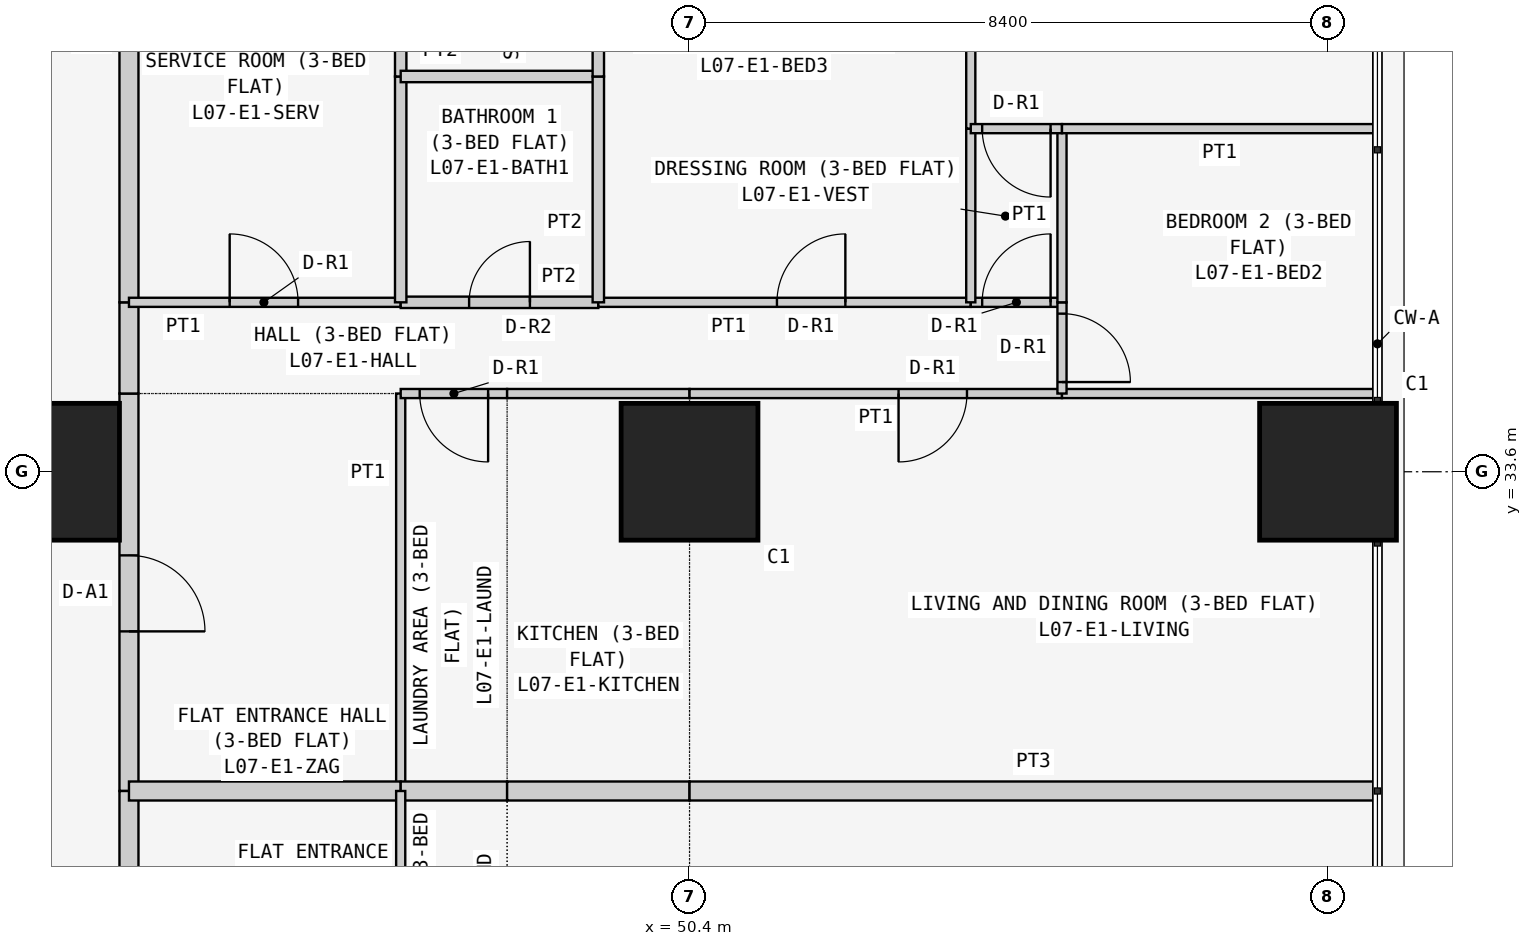
"""IFC4 building model, lengths in metres.
Left out: names, types, materials, properties, quantities, classifications, styles, units other than length and angle.
Written with IfcOpenShell. Run it as: python <this file> out.ifc"""

import sys

from ifc_helpers import new_model, si_unit, direction, frame, frame_2d, origin, origin_2d, place, context, subcontext, project, spatial, rectangle, extrude, element, fill, save


model = new_model("IFC4")
c1 = context("Model", 3, precision=1e-05, world=origin(), true_north=direction((0.0, 1.0)))
c2 = subcontext(c1, "Body", "Model", "MODEL_VIEW")
j1 = project(units=[si_unit("LENGTHUNIT", "METRE"), si_unit("PLANEANGLEUNIT", "RADIAN")], contexts=[c1])
p1 = place(None, origin())
s1 = spatial("IfcSite", under=j1, at=p1, CompositionType="ELEMENT")
p2 = place(p1, origin())
s2 = spatial("IfcBuilding", under=s1, at=p2, CompositionType="ELEMENT")
p3 = place(p2, frame((0.0, 0.0, 34.5)))
s3 = spatial("IfcBuildingStorey", under=s2, at=p3, CompositionType="ELEMENT", Elevation=34.5)
for number, where, z_axis, x_axis in (
    (1, (42.0, 33.6, 0.0), (0.0, 0.0, 1.0), (1.0, 0.0, 0.0)),
    (2, (50.4, 33.6, 0.0), (0.0, 0.0, 1.0), (1.0, 0.0, 0.0)),
    (3, (58.8, 33.6, 0.0), (0.0, 0.0, 1.0), (1.0, 0.0, 0.0)),
):
    element("IfcColumn", number, at=place(p3, frame(where, z_axis=z_axis, x_axis=x_axis)), inside=s3, PredefinedType="COLUMN", context=c2, shape_type="SweptSolid", body=[
        extrude(rectangle(XDim=1.8, YDim=1.8, at=origin_2d()), origin(), (0.0, 0.0, 1.0), 3.6),
    ])
p4 = place(p3, frame((43.025, 34.629, 0.0), z_axis=(0.0, 0.0, 1.0), x_axis=(0.0, -1.0, 0.0)))
e4 = element("IfcWall", 4, at=p4, inside=s3, PredefinedType="PARTITIONING", context=c2, shape_type="SweptSolid", body=[
    extrude(rectangle(XDim=5.229, YDim=0.25, at=frame_2d((2.615, 0.0))), origin(), (0.0, 0.0, 1.0), 3.45),
])
p5 = place(p4, frame((2.129, 0.0, 0.0)))
e5 = element("IfcOpeningElement", 5, at=p5, cuts=e4, PredefinedType="OPENING", context=c2, shape_type="SweptSolid", body=[
    extrude(rectangle(XDim=1.0, YDim=2.1, at=frame_2d((0.5, 1.05))), frame((0.0, 0.135, 0.0), z_axis=(0.0, -1.0, 0.0), x_axis=(1.0, 0.0, 0.0)), (0.0, 0.0, 1.0), 0.27),
])
p6 = place(p3, frame((43.025, 35.829, 0.0), z_axis=(0.0, 0.0, 1.0), x_axis=(0.0, -1.0, 0.0)))
e6 = element("IfcWall", 6, at=p6, inside=s3, PredefinedType="PARTITIONING", context=c2, shape_type="SweptSolid", body=[
    extrude(rectangle(XDim=1.2, YDim=0.25, at=frame_2d((0.6, 0.0))), origin(), (0.0, 0.0, 1.0), 3.45),
])
p7 = place(p3, frame((43.025, 42.7, 0.0), z_axis=(0.0, 0.0, 1.0), x_axis=(0.0, -1.0, 0.0)))
e7 = element("IfcWall", 7, at=p7, inside=s3, PredefinedType="PARTITIONING", context=c2, shape_type="SweptSolid", body=[
    extrude(rectangle(XDim=6.871, YDim=0.25, at=frame_2d((3.436, 0.0))), origin(), (0.0, 0.0, 1.0), 3.45),
])
p8 = place(p3, frame((43.025, 29.4, 0.0), z_axis=(0.0, 0.0, 1.0), x_axis=(0.0, -1.0, 0.0)))
e8 = element("IfcWall", 8, at=p8, inside=s3, PredefinedType="PARTITIONING", context=c2, shape_type="SweptSolid", body=[
    extrude(rectangle(XDim=5.229, YDim=0.25, at=frame_2d((2.615, 0.0))), origin(), (0.0, 0.0, 1.0), 3.45),
])
p9 = place(p8, frame((2.1, 0.0, 0.0)))
e9 = element("IfcOpeningElement", 9, at=p9, cuts=e8, PredefinedType="OPENING", context=c2, shape_type="SweptSolid", body=[
    extrude(rectangle(XDim=1.0, YDim=2.1, at=frame_2d((0.5, 1.05))), frame((0.0, 0.135, 0.0), z_axis=(0.0, -1.0, 0.0), x_axis=(1.0, 0.0, 0.0)), (0.0, 0.0, 1.0), 0.27),
])
p10 = place(p3, frame((46.6, 29.4, 0.0), z_axis=(0.0, 0.0, 1.0), x_axis=(0.0, 1.0, 0.0)))
e10 = element("IfcWall", 10, at=p10, inside=s3, PredefinedType="PARTITIONING", context=c2, shape_type="SweptSolid", body=[
    extrude(rectangle(XDim=5.229, YDim=0.12, at=frame_2d((2.615, 0.0))), origin(), (0.0, 0.0, 1.0), 3.45),
])
p11 = place(p3, frame((43.025, 29.4, 0.0), z_axis=(0.0, 0.0, 1.0), x_axis=(1.0, 0.0, 0.0)))
e11 = element("IfcWall", 11, at=p11, inside=s3, PredefinedType="PARTITIONING", context=c2, shape_type="SweptSolid", body=[
    extrude(rectangle(XDim=3.575, YDim=0.25, at=frame_2d((1.788, 0.0))), origin(), (0.0, 0.0, 1.0), 3.45),
])
p12 = place(p3, frame((48.0, 34.629, 0.0), z_axis=(0.0, 0.0, 1.0), x_axis=(-1.0, 0.0, 0.0)))
e12 = element("IfcWall", 12, at=p12, inside=s3, PredefinedType="PARTITIONING", context=c2, shape_type="SweptSolid", body=[
    extrude(rectangle(XDim=1.4, YDim=0.12, at=frame_2d((0.7, 0.0))), origin(), (0.0, 0.0, 1.0), 3.45),
])
p13 = place(p12, frame((0.25, 0.0, 0.0)))
e13 = element("IfcOpeningElement", 13, at=p13, cuts=e12, PredefinedType="OPENING", context=c2, shape_type="SweptSolid", body=[
    extrude(rectangle(XDim=0.9, YDim=2.1, at=frame_2d((0.45, 1.05))), frame((0.0, 0.07, 0.0), z_axis=(0.0, -1.0, 0.0), x_axis=(1.0, 0.0, 0.0)), (0.0, 0.0, 1.0), 0.14),
])
p14 = place(p3, frame((46.6, 29.4, 0.0), z_axis=(0.0, 0.0, 1.0), x_axis=(1.0, 0.0, 0.0)))
e14 = element("IfcWall", 14, at=p14, inside=s3, PredefinedType="PARTITIONING", context=c2, shape_type="SweptSolid", body=[
    extrude(rectangle(XDim=1.4, YDim=0.25, at=frame_2d((0.7, 0.0))), origin(), (0.0, 0.0, 1.0), 3.45),
])
p15 = place(p3, frame((50.4, 34.629, 0.0), z_axis=(0.0, 0.0, 1.0), x_axis=(-1.0, 0.0, 0.0)))
e15 = element("IfcWall", 15, at=p15, inside=s3, PredefinedType="PARTITIONING", context=c2, shape_type="SweptSolid", body=[
    extrude(rectangle(XDim=2.4, YDim=0.12, at=frame_2d((1.2, 0.0))), origin(), (0.0, 0.0, 1.0), 3.45),
])
p16 = place(p3, frame((48.0, 29.4, 0.0), z_axis=(0.0, 0.0, 1.0), x_axis=(1.0, 0.0, 0.0)))
e16 = element("IfcWall", 16, at=p16, inside=s3, PredefinedType="PARTITIONING", context=c2, shape_type="SweptSolid", body=[
    extrude(rectangle(XDim=2.4, YDim=0.25, at=frame_2d((1.2, 0.0))), origin(), (0.0, 0.0, 1.0), 3.45),
])
p17 = place(p3, frame((55.3, 34.629, 0.0), z_axis=(0.0, 0.0, 1.0), x_axis=(-1.0, 0.0, 0.0)))
e17 = element("IfcWall", 17, at=p17, inside=s3, PredefinedType="PARTITIONING", context=c2, shape_type="SweptSolid", body=[
    extrude(rectangle(XDim=4.9, YDim=0.12, at=frame_2d((2.45, 0.0))), origin(), (0.0, 0.0, 1.0), 3.45),
])
p18 = place(p17, frame((1.25, 0.0, 0.0)))
e18 = element("IfcOpeningElement", 18, at=p18, cuts=e17, PredefinedType="OPENING", context=c2, shape_type="SweptSolid", body=[
    extrude(rectangle(XDim=0.9, YDim=2.1, at=frame_2d((0.45, 1.05))), frame((0.0, 0.07, 0.0), z_axis=(0.0, -1.0, 0.0), x_axis=(1.0, 0.0, 0.0)), (0.0, 0.0, 1.0), 0.14),
])
p19 = place(p3, frame((59.45, 34.629, 0.0), z_axis=(0.0, 0.0, 1.0), x_axis=(-1.0, 0.0, 0.0)))
e19 = element("IfcWall", 19, at=p19, inside=s3, PredefinedType="PARTITIONING", context=c2, shape_type="SweptSolid", body=[
    extrude(rectangle(XDim=4.15, YDim=0.12, at=frame_2d((2.075, 0.0))), origin(), (0.0, 0.0, 1.0), 3.45),
])
p20 = place(p3, frame((50.4, 29.4, 0.0), z_axis=(0.0, 0.0, 1.0), x_axis=(1.0, 0.0, 0.0)))
e20 = element("IfcWall", 20, at=p20, inside=s3, PredefinedType="PARTITIONING", context=c2, shape_type="SweptSolid", body=[
    extrude(rectangle(XDim=9.05, YDim=0.25, at=frame_2d((4.525, 0.0))), origin(), (0.0, 0.0, 1.0), 3.45),
])
p21 = place(p3, frame((46.6, 35.829, 0.0), z_axis=(0.0, 0.0, 1.0), x_axis=(-1.0, 0.0, 0.0)))
e21 = element("IfcWall", 21, at=p21, inside=s3, PredefinedType="PARTITIONING", context=c2, shape_type="SweptSolid", body=[
    extrude(rectangle(XDim=3.575, YDim=0.12, at=frame_2d((1.788, 0.0))), origin(), (0.0, 0.0, 1.0), 3.45),
])
p22 = place(p21, frame((1.35, 0.0, 0.0)))
e22 = element("IfcOpeningElement", 22, at=p22, cuts=e21, PredefinedType="OPENING", context=c2, shape_type="SweptSolid", body=[
    extrude(rectangle(XDim=0.9, YDim=2.1, at=frame_2d((0.45, 1.05))), frame((0.0, 0.07, 0.0), z_axis=(0.0, -1.0, 0.0), x_axis=(1.0, 0.0, 0.0)), (0.0, 0.0, 1.0), 0.14),
])
p23 = place(p3, frame((49.2, 35.829, 0.0), z_axis=(0.0, 0.0, 1.0), x_axis=(-1.0, 0.0, 0.0)))
e23 = element("IfcWall", 23, at=p23, inside=s3, PredefinedType="PARTITIONING", context=c2, shape_type="SweptSolid", body=[
    extrude(rectangle(XDim=2.6, YDim=0.15, at=frame_2d((1.3, 0.0))), origin(), (0.0, 0.0, 1.0), 3.45),
])
p24 = place(p23, frame((0.9, 0.0, 0.0)))
e24 = element("IfcOpeningElement", 24, at=p24, cuts=e23, PredefinedType="OPENING", context=c2, shape_type="SweptSolid", body=[
    extrude(rectangle(XDim=0.8, YDim=2.1, at=frame_2d((0.4, 1.05))), frame((0.0, 0.085, 0.0), z_axis=(0.0, -1.0, 0.0), x_axis=(1.0, 0.0, 0.0)), (0.0, 0.0, 1.0), 0.17),
])
p25 = place(p3, frame((54.1, 35.829, 0.0), z_axis=(0.0, 0.0, 1.0), x_axis=(-1.0, 0.0, 0.0)))
e25 = element("IfcWall", 25, at=p25, inside=s3, PredefinedType="PARTITIONING", context=c2, shape_type="SweptSolid", body=[
    extrude(rectangle(XDim=4.9, YDim=0.12, at=frame_2d((2.45, 0.0))), origin(), (0.0, 0.0, 1.0), 3.45),
])
p26 = place(p25, frame((1.65, 0.0, 0.0)))
e26 = element("IfcOpeningElement", 26, at=p26, cuts=e25, PredefinedType="OPENING", context=c2, shape_type="SweptSolid", body=[
    extrude(rectangle(XDim=0.9, YDim=2.1, at=frame_2d((0.45, 1.05))), frame((0.0, 0.07, 0.0), z_axis=(0.0, -1.0, 0.0), x_axis=(1.0, 0.0, 0.0)), (0.0, 0.0, 1.0), 0.14),
])
p27 = place(p3, frame((55.3, 35.829, 0.0), z_axis=(0.0, 0.0, 1.0), x_axis=(-1.0, 0.0, 0.0)))
e27 = element("IfcWall", 27, at=p27, inside=s3, PredefinedType="PARTITIONING", context=c2, shape_type="SweptSolid", body=[
    extrude(rectangle(XDim=1.2, YDim=0.12, at=frame_2d((0.6, 0.0))), origin(), (0.0, 0.0, 1.0), 3.45),
])
p28 = place(p27, frame((0.15, 0.0, 0.0)))
e28 = element("IfcOpeningElement", 28, at=p28, cuts=e27, PredefinedType="OPENING", context=c2, shape_type="SweptSolid", body=[
    extrude(rectangle(XDim=0.9, YDim=2.1, at=frame_2d((0.45, 1.05))), frame((0.0, 0.07, 0.0), z_axis=(0.0, -1.0, 0.0), x_axis=(1.0, 0.0, 0.0)), (0.0, 0.0, 1.0), 0.14),
])
p29 = place(p3, frame((55.3, 34.629, 0.0), z_axis=(0.0, 0.0, 1.0), x_axis=(0.0, 1.0, 0.0)))
e29 = element("IfcWall", 29, at=p29, inside=s3, PredefinedType="PARTITIONING", context=c2, shape_type="SweptSolid", body=[
    extrude(rectangle(XDim=1.2, YDim=0.12, at=frame_2d((0.6, 0.0))), origin(), (0.0, 0.0, 1.0), 3.45),
])
p30 = place(p29, frame((0.151, 0.0, 0.0)))
e30 = element("IfcOpeningElement", 30, at=p30, cuts=e29, PredefinedType="OPENING", context=c2, shape_type="SweptSolid", body=[
    extrude(rectangle(XDim=0.9, YDim=2.1, at=frame_2d((0.45, 1.05))), frame((0.0, 0.07, 0.0), z_axis=(0.0, -1.0, 0.0), x_axis=(1.0, 0.0, 0.0)), (0.0, 0.0, 1.0), 0.14),
])
p31 = place(p3, frame((46.6, 35.829, 0.0), z_axis=(0.0, 0.0, 1.0), x_axis=(0.0, 1.0, 0.0)))
e31 = element("IfcWall", 31, at=p31, inside=s3, PredefinedType="PARTITIONING", context=c2, shape_type="SweptSolid", body=[
    extrude(rectangle(XDim=2.971, YDim=0.15, at=frame_2d((1.485, 0.0))), origin(), (0.0, 0.0, 1.0), 3.45),
])
p32 = place(p3, frame((46.6, 38.8, 0.0), z_axis=(0.0, 0.0, 1.0), x_axis=(0.0, 1.0, 0.0)))
e32 = element("IfcWall", 32, at=p32, inside=s3, PredefinedType="PARTITIONING", context=c2, shape_type="SweptSolid", body=[
    extrude(rectangle(XDim=3.9, YDim=0.15, at=frame_2d((1.95, 0.0))), origin(), (0.0, 0.0, 1.0), 3.45),
])
p33 = place(p32, frame((1.55, 0.0, 0.0)))
e33 = element("IfcOpeningElement", 33, at=p33, cuts=e32, PredefinedType="OPENING", context=c2, shape_type="SweptSolid", body=[
    extrude(rectangle(XDim=0.8, YDim=2.1, at=frame_2d((0.4, 1.05))), frame((0.0, 0.085, 0.0), z_axis=(0.0, -1.0, 0.0), x_axis=(1.0, 0.0, 0.0)), (0.0, 0.0, 1.0), 0.17),
])
p34 = place(p3, frame((49.2, 38.8, 0.0), z_axis=(0.0, 0.0, 1.0), x_axis=(-1.0, 0.0, 0.0)))
e34 = element("IfcWall", 34, at=p34, inside=s3, PredefinedType="PARTITIONING", context=c2, shape_type="SweptSolid", body=[
    extrude(rectangle(XDim=2.6, YDim=0.15, at=frame_2d((1.3, 0.0))), origin(), (0.0, 0.0, 1.0), 3.45),
])
p35 = place(p3, frame((49.2, 35.829, 0.0), z_axis=(0.0, 0.0, 1.0), x_axis=(0.0, 1.0, 0.0)))
e35 = element("IfcWall", 35, at=p35, inside=s3, PredefinedType="PARTITIONING", context=c2, shape_type="SweptSolid", body=[
    extrude(rectangle(XDim=2.971, YDim=0.15, at=frame_2d((1.485, 0.0))), origin(), (0.0, 0.0, 1.0), 3.45),
])
p36 = place(p3, frame((49.2, 38.8, 0.0), z_axis=(0.0, 0.0, 1.0), x_axis=(0.0, 1.0, 0.0)))
e36 = element("IfcWall", 36, at=p36, inside=s3, PredefinedType="PARTITIONING", context=c2, shape_type="SweptSolid", body=[
    extrude(rectangle(XDim=3.9, YDim=0.15, at=frame_2d((1.95, 0.0))), origin(), (0.0, 0.0, 1.0), 3.45),
])
p37 = place(p3, frame((54.1, 35.829, 0.0), z_axis=(0.0, 0.0, 1.0), x_axis=(0.0, 1.0, 0.0)))
e37 = element("IfcWall", 37, at=p37, inside=s3, PredefinedType="PARTITIONING", context=c2, shape_type="SweptSolid", body=[
    extrude(rectangle(XDim=2.285, YDim=0.12, at=frame_2d((1.143, 0.0))), origin(), (0.0, 0.0, 1.0), 3.45),
])
p38 = place(p3, frame((54.1, 38.114, 0.0), z_axis=(0.0, 0.0, 1.0), x_axis=(0.0, 1.0, 0.0)))
e38 = element("IfcWall", 38, at=p38, inside=s3, PredefinedType="PARTITIONING", context=c2, shape_type="SweptSolid", body=[
    extrude(rectangle(XDim=4.586, YDim=0.12, at=frame_2d((2.293, 0.0))), origin(), (0.0, 0.0, 1.0), 3.45),
])
p39 = place(p3, frame((55.3, 35.829, 0.0), z_axis=(0.0, 0.0, 1.0), x_axis=(0.0, 1.0, 0.0)))
e39 = element("IfcWall", 39, at=p39, inside=s3, PredefinedType="PARTITIONING", context=c2, shape_type="SweptSolid", body=[
    extrude(rectangle(XDim=2.285, YDim=0.12, at=frame_2d((1.143, 0.0))), origin(), (0.0, 0.0, 1.0), 3.45),
])
p40 = place(p3, frame((55.3, 38.114, 0.0), z_axis=(0.0, 0.0, 1.0), x_axis=(-1.0, 0.0, 0.0)))
e40 = element("IfcWall", 40, at=p40, inside=s3, PredefinedType="PARTITIONING", context=c2, shape_type="SweptSolid", body=[
    extrude(rectangle(XDim=1.2, YDim=0.12, at=frame_2d((0.6, 0.0))), origin(), (0.0, 0.0, 1.0), 3.45),
])
p41 = place(p40, frame((0.15, 0.0, 0.0)))
e41 = element("IfcOpeningElement", 41, at=p41, cuts=e40, PredefinedType="OPENING", context=c2, shape_type="SweptSolid", body=[
    extrude(rectangle(XDim=0.9, YDim=2.1, at=frame_2d((0.45, 1.05))), frame((0.0, 0.07, 0.0), z_axis=(0.0, -1.0, 0.0), x_axis=(1.0, 0.0, 0.0)), (0.0, 0.0, 1.0), 0.14),
])
p42 = place(p3, frame((59.45, 38.114, 0.0), z_axis=(0.0, 0.0, 1.0), x_axis=(-1.0, 0.0, 0.0)))
e42 = element("IfcWall", 42, at=p42, inside=s3, PredefinedType="PARTITIONING", context=c2, shape_type="SweptSolid", body=[
    extrude(rectangle(XDim=4.15, YDim=0.12, at=frame_2d((2.075, 0.0))), origin(), (0.0, 0.0, 1.0), 3.45),
])
p43 = place(p3, frame((46.6, 29.4, 0.0), z_axis=(0.0, 0.0, 1.0), x_axis=(0.0, -1.0, 0.0)))
e43 = element("IfcWall", 43, at=p43, inside=s3, PredefinedType="PARTITIONING", context=c2, shape_type="SweptSolid", body=[
    extrude(rectangle(XDim=5.229, YDim=0.12, at=frame_2d((2.615, 0.0))), origin(), (0.0, 0.0, 1.0), 3.45),
])
p44 = place(p5, origin())
e44 = element("IfcDoor", 44, at=p44, inside=s3, OperationType="SINGLE_SWING_RIGHT", PredefinedType="DOOR", context=c2, shape_type="SweptSolid", body=[
    extrude(rectangle(XDim=1.0, YDim=2.1, at=frame_2d((0.5, 1.05))), frame((0.0, 0.025, 0.0), z_axis=(0.0, -1.0, 0.0), x_axis=(1.0, 0.0, 0.0)), (0.0, 0.0, 1.0), 0.05),
])
fill(e5, e44)
p45 = place(p13, origin())
e45 = element("IfcDoor", 45, at=p45, inside=s3, OperationType="SINGLE_SWING_LEFT", PredefinedType="DOOR", context=c2, shape_type="SweptSolid", body=[
    extrude(rectangle(XDim=0.9, YDim=2.1, at=frame_2d((0.45, 1.05))), frame((0.0, 0.025, 0.0), z_axis=(0.0, -1.0, 0.0), x_axis=(1.0, 0.0, 0.0)), (0.0, 0.0, 1.0), 0.05),
])
fill(e13, e45)
p46 = place(p18, origin())
e46 = element("IfcDoor", 46, at=p46, inside=s3, OperationType="SINGLE_SWING_RIGHT", PredefinedType="DOOR", context=c2, shape_type="SweptSolid", body=[
    extrude(rectangle(XDim=0.9, YDim=2.1, at=frame_2d((0.45, 1.05))), frame((0.0, 0.025, 0.0), z_axis=(0.0, -1.0, 0.0), x_axis=(1.0, 0.0, 0.0)), (0.0, 0.0, 1.0), 0.05),
])
fill(e18, e46)
p47 = place(p22, frame((0.9, 0.0, 0.0), z_axis=(0.0, 0.0, 1.0), x_axis=(-1.0, 0.0, 0.0)))
e47 = element("IfcDoor", 47, at=p47, inside=s3, OperationType="SINGLE_SWING_LEFT", PredefinedType="DOOR", context=c2, shape_type="SweptSolid", body=[
    extrude(rectangle(XDim=0.9, YDim=2.1, at=frame_2d((0.45, 1.05))), frame((0.0, 0.025, 0.0), z_axis=(0.0, -1.0, 0.0), x_axis=(1.0, 0.0, 0.0)), (0.0, 0.0, 1.0), 0.05),
])
fill(e22, e47)
p48 = place(p24, frame((0.8, 0.0, 0.0), z_axis=(0.0, 0.0, 1.0), x_axis=(-1.0, 0.0, 0.0)))
e48 = element("IfcDoor", 48, at=p48, inside=s3, OperationType="SINGLE_SWING_RIGHT", PredefinedType="DOOR", context=c2, shape_type="SweptSolid", body=[
    extrude(rectangle(XDim=0.8, YDim=2.1, at=frame_2d((0.4, 1.05))), frame((0.0, 0.025, 0.0), z_axis=(0.0, -1.0, 0.0), x_axis=(1.0, 0.0, 0.0)), (0.0, 0.0, 1.0), 0.05),
])
fill(e24, e48)
p49 = place(p26, frame((0.9, 0.0, 0.0), z_axis=(0.0, 0.0, 1.0), x_axis=(-1.0, 0.0, 0.0)))
e49 = element("IfcDoor", 49, at=p49, inside=s3, OperationType="SINGLE_SWING_RIGHT", PredefinedType="DOOR", context=c2, shape_type="SweptSolid", body=[
    extrude(rectangle(XDim=0.9, YDim=2.1, at=frame_2d((0.45, 1.05))), frame((0.0, 0.025, 0.0), z_axis=(0.0, -1.0, 0.0), x_axis=(1.0, 0.0, 0.0)), (0.0, 0.0, 1.0), 0.05),
])
fill(e26, e49)
p50 = place(p28, frame((0.9, 0.0, 0.0), z_axis=(0.0, 0.0, 1.0), x_axis=(-1.0, 0.0, 0.0)))
e50 = element("IfcDoor", 50, at=p50, inside=s3, OperationType="SINGLE_SWING_RIGHT", PredefinedType="DOOR", context=c2, shape_type="SweptSolid", body=[
    extrude(rectangle(XDim=0.9, YDim=2.1, at=frame_2d((0.45, 1.05))), frame((0.0, 0.025, 0.0), z_axis=(0.0, -1.0, 0.0), x_axis=(1.0, 0.0, 0.0)), (0.0, 0.0, 1.0), 0.05),
])
fill(e28, e50)
p51 = place(p41, origin())
e51 = element("IfcDoor", 51, at=p51, inside=s3, OperationType="SINGLE_SWING_LEFT", PredefinedType="DOOR", context=c2, shape_type="SweptSolid", body=[
    extrude(rectangle(XDim=0.9, YDim=2.1, at=frame_2d((0.45, 1.05))), frame((0.0, 0.025, 0.0), z_axis=(0.0, -1.0, 0.0), x_axis=(1.0, 0.0, 0.0)), (0.0, 0.0, 1.0), 0.05),
])
fill(e41, e51)
p52 = place(p30, frame((0.9, 0.0, 0.0), z_axis=(0.0, 0.0, 1.0), x_axis=(-1.0, 0.0, 0.0)))
e52 = element("IfcDoor", 52, at=p52, inside=s3, OperationType="SINGLE_SWING_RIGHT", PredefinedType="DOOR", context=c2, shape_type="SweptSolid", body=[
    extrude(rectangle(XDim=0.9, YDim=2.1, at=frame_2d((0.45, 1.05))), frame((0.0, 0.025, 0.0), z_axis=(0.0, -1.0, 0.0), x_axis=(1.0, 0.0, 0.0)), (0.0, 0.0, 1.0), 0.05),
])
fill(e30, e52)
save(model, sys.argv[1])
